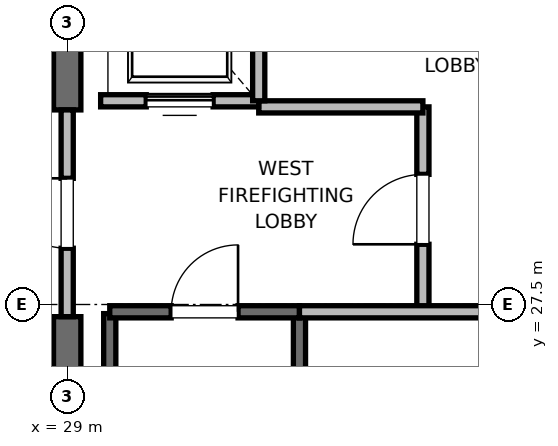
"""IFC4 building model, lengths in metres.
Left out: names, types, materials, properties, quantities, classifications, styles, units other than length and angle.
Written with IfcOpenShell. Run it as: python <this file> out.ifc"""

import sys

from ifc_helpers import new_model, si_unit, direction, frame, frame_2d, origin, place, context, subcontext, project, spatial, rectangle, extrude, element, fill, save


model = new_model("IFC4")
c1 = context("Model", 3, precision=1e-05, world=origin(), true_north=direction((0.0, 1.0)))
c2 = subcontext(c1, "Body", "Model", "MODEL_VIEW")
j1 = project(units=[si_unit("LENGTHUNIT", "METRE"), si_unit("PLANEANGLEUNIT", "RADIAN")], contexts=[c1])
p1 = place(None, origin())
s1 = spatial("IfcSite", under=j1, at=p1, CompositionType="ELEMENT")
p2 = place(p1, origin())
s2 = spatial("IfcBuilding", under=s1, at=p2, CompositionType="ELEMENT")
p3 = place(p2, frame((0.0, 0.0, 271.2)))
s3 = spatial("IfcBuildingStorey", under=s2, at=p3, CompositionType="ELEMENT", Elevation=271.2)
p4 = place(p3, frame((29.0, 18.5, 0.0), z_axis=(0.0, 0.0, 1.0), x_axis=(0.0, 1.0, 0.0)))
e1 = element("IfcWall", 1, at=p4, inside=s3, PredefinedType="SHEAR", context=c2, shape_type="SweptSolid", body=[
    extrude(rectangle(XDim=8.8, YDim=0.45, at=frame_2d((4.4, 0.0))), origin(), (0.0, 0.0, 1.0), 3.785),
])
p5 = place(p3, frame((29.0, 30.7, 0.0), z_axis=(0.0, 0.0, 1.0), x_axis=(0.0, 1.0, 0.0)))
e2 = element("IfcWall", 2, at=p5, inside=s3, PredefinedType="SHEAR", context=c2, shape_type="SweptSolid", body=[
    extrude(rectangle(XDim=5.8, YDim=0.45, at=frame_2d((2.9, 0.0))), origin(), (0.0, 0.0, 1.0), 3.785),
])
p6 = place(p3, frame((29.7, 19.2, 0.0), z_axis=(0.0, 0.0, 1.0), x_axis=(0.0, 1.0, 0.0)))
e3 = element("IfcWall", 3, at=p6, inside=s3, PredefinedType="SOLIDWALL", context=c2, shape_type="SweptSolid", body=[
    extrude(rectangle(XDim=8.15, YDim=0.2, at=frame_2d((4.075, 0.0))), origin(), (0.0, 0.0, 1.0), 3.785),
])
p7 = place(p3, frame((32.82, 18.6, 0.0), z_axis=(0.0, 0.0, 1.0), x_axis=(0.0, 1.0, 0.0)))
e4 = element("IfcWall", 4, at=p7, inside=s3, PredefinedType="SOLIDWALL", context=c2, shape_type="SweptSolid", body=[
    extrude(rectangle(XDim=8.78, YDim=0.2, at=frame_2d((4.39, 0.0))), origin(), (0.0, 0.0, 1.0), 3.785),
])
p8 = place(p3, frame((29.7, 27.38, 0.0), z_axis=(0.0, 0.0, 1.0), x_axis=(1.0, 0.0, 0.0)))
e5 = element("IfcWall", 5, at=p8, inside=s3, PredefinedType="SOLIDWALL", context=c2, shape_type="SweptSolid", body=[
    extrude(rectangle(XDim=3.12, YDim=0.2, at=frame_2d((1.56, 0.0))), origin(), (0.0, 0.0, 1.0), 3.785),
])
p9 = place(p8, frame((1.01, 0.0, 0.0)))
e6 = element("IfcOpeningElement", 6, at=p9, cuts=e5, PredefinedType="OPENING", context=c2, shape_type="SweptSolid", body=[
    extrude(rectangle(XDim=1.1, YDim=2.15, at=frame_2d((0.55, 1.075))), frame((0.0, 0.1, 0.0), z_axis=(0.0, -1.0, 0.0), x_axis=(1.0, 0.0, 0.0)), (0.0, 0.0, 1.0), 0.2),
])
p10 = place(p3, frame((34.85, 27.38, 0.0), z_axis=(0.0, 0.0, 1.0), x_axis=(0.0, 1.0, 0.0)))
e7 = element("IfcWall", 7, at=p10, inside=s3, PredefinedType="PARTITIONING", context=c2, shape_type="SweptSolid", body=[
    extrude(rectangle(XDim=3.37, YDim=0.2, at=frame_2d((1.685, 0.0))), origin(), (0.0, 0.0, 1.0), 3.785),
])
p11 = place(p10, frame((1.11, 0.0, 0.0)))
e8 = element("IfcOpeningElement", 8, at=p11, cuts=e7, PredefinedType="OPENING", context=c2, shape_type="SweptSolid", body=[
    extrude(rectangle(XDim=1.15, YDim=2.2, at=frame_2d((0.575, 1.1))), frame((0.0, 0.1, 0.0), z_axis=(0.0, -1.0, 0.0), x_axis=(1.0, 0.0, 0.0)), (0.0, 0.0, 1.0), 0.2),
])
p12 = place(p3, frame((29.0, 27.3, 0.0), z_axis=(0.0, 0.0, 1.0), x_axis=(0.0, 1.0, 0.0)))
e9 = element("IfcWall", 9, at=p12, inside=s3, PredefinedType="PARTITIONING", context=c2, shape_type="SweptSolid", body=[
    extrude(rectangle(XDim=3.4, YDim=0.2, at=frame_2d((1.7, 0.0))), origin(), (0.0, 0.0, 1.0), 2.865),
])
p13 = place(p12, frame((1.125, 0.0, 0.0)))
e10 = element("IfcOpeningElement", 10, at=p13, cuts=e9, PredefinedType="OPENING", context=c2, shape_type="SweptSolid", body=[
    extrude(rectangle(XDim=1.15, YDim=2.2, at=frame_2d((0.575, 1.1))), frame((0.0, 0.1, 0.0), z_axis=(0.0, -1.0, 0.0), x_axis=(1.0, 0.0, 0.0)), (0.0, 0.0, 1.0), 0.2),
])
p14 = place(p3, frame((32.82, 27.38, 0.0), z_axis=(0.0, 0.0, 1.0), x_axis=(1.0, 0.0, 0.0)))
e11 = element("IfcWall", 11, at=p14, inside=s3, PredefinedType="PARTITIONING", context=c2, shape_type="SweptSolid", body=[
    extrude(rectangle(XDim=5.62, YDim=0.2, at=frame_2d((2.81, 0.0))), origin(), (0.0, 0.0, 1.0), 3.785),
])
p15 = place(p3, frame((32.15, 30.75, 0.0), z_axis=(0.0, 0.0, 1.0), x_axis=(1.0, 0.0, 0.0)))
e12 = element("IfcWall", 12, at=p15, inside=s3, PredefinedType="PARTITIONING", context=c2, shape_type="SweptSolid", body=[
    extrude(rectangle(XDim=2.7, YDim=0.2, at=frame_2d((1.35, 0.0))), origin(), (0.0, 0.0, 1.0), 3.785),
])
p16 = place(p3, frame((29.55, 30.85, 0.0), z_axis=(0.0, 0.0, 1.0), x_axis=(1.0, 0.0, 0.0)))
e13 = element("IfcWall", 13, at=p16, inside=s3, PredefinedType="SOLIDWALL", context=c2, shape_type="SweptSolid", body=[
    extrude(rectangle(XDim=2.6, YDim=0.2, at=frame_2d((1.3, 0.0))), origin(), (0.0, 0.0, 1.0), 2.865),
])
p17 = place(p16, frame((0.75, 0.0, 0.0)))
e14 = element("IfcOpeningElement", 14, at=p17, cuts=e13, PredefinedType="OPENING", context=c2, shape_type="SweptSolid", body=[
    extrude(rectangle(XDim=1.1, YDim=2.2, at=frame_2d((0.55, 1.1))), frame((0.0, 0.1, 0.0), z_axis=(0.0, -1.0, 0.0), x_axis=(1.0, 0.0, 0.0)), (0.0, 0.0, 1.0), 0.2),
])
p18 = place(p3, frame((32.15, 30.85, 0.0), z_axis=(0.0, 0.0, 1.0), x_axis=(0.0, 1.0, 0.0)))
e15 = element("IfcWall", 15, at=p18, inside=s3, PredefinedType="SOLIDWALL", context=c2, shape_type="SweptSolid", body=[
    extrude(rectangle(XDim=3.0, YDim=0.2, at=frame_2d((1.5, 0.0))), origin(), (0.0, 0.0, 1.0), 3.785),
])
p19 = place(p9, origin())
e16 = element("IfcDoor", 16, at=p19, inside=s3, OperationType="SINGLE_SWING_RIGHT", PredefinedType="DOOR", context=c2, shape_type="SweptSolid", body=[
    extrude(rectangle(XDim=1.1, YDim=2.15, at=frame_2d((0.55, 1.075))), frame((0.0, 0.025, 0.0), z_axis=(0.0, -1.0, 0.0), x_axis=(1.0, 0.0, 0.0)), (0.0, 0.0, 1.0), 0.05),
])
fill(e6, e16)
p20 = place(p11, origin())
e17 = element("IfcDoor", 17, at=p20, inside=s3, OperationType="SINGLE_SWING_LEFT", PredefinedType="DOOR", context=c2, shape_type="SweptSolid", body=[
    extrude(rectangle(XDim=1.15, YDim=2.2, at=frame_2d((0.575, 1.1))), frame((0.0, 0.025, 0.0), z_axis=(0.0, -1.0, 0.0), x_axis=(1.0, 0.0, 0.0)), (0.0, 0.0, 1.0), 0.05),
])
fill(e8, e17)
p21 = place(p13, origin())
e18 = element("IfcDoor", 18, at=p21, inside=s3, OperationType="SINGLE_SWING_RIGHT", PredefinedType="DOOR", context=c2, shape_type="SweptSolid", body=[
    extrude(rectangle(XDim=1.15, YDim=2.2, at=frame_2d((0.575, 1.1))), frame((0.0, 0.025, 0.0), z_axis=(0.0, -1.0, 0.0), x_axis=(1.0, 0.0, 0.0)), (0.0, 0.0, 1.0), 0.05),
])
fill(e10, e18)
p22 = place(p17, origin())
e19 = element("IfcDoor", 19, at=p22, inside=s3, OperationType="SLIDING_TO_RIGHT", PredefinedType="DOOR", context=c2, shape_type="SweptSolid", body=[
    extrude(rectangle(XDim=1.1, YDim=2.2, at=frame_2d((0.55, 1.1))), frame((0.0, 0.025, 0.0), z_axis=(0.0, -1.0, 0.0), x_axis=(1.0, 0.0, 0.0)), (0.0, 0.0, 1.0), 0.05),
])
fill(e14, e19)
save(model, sys.argv[1])
